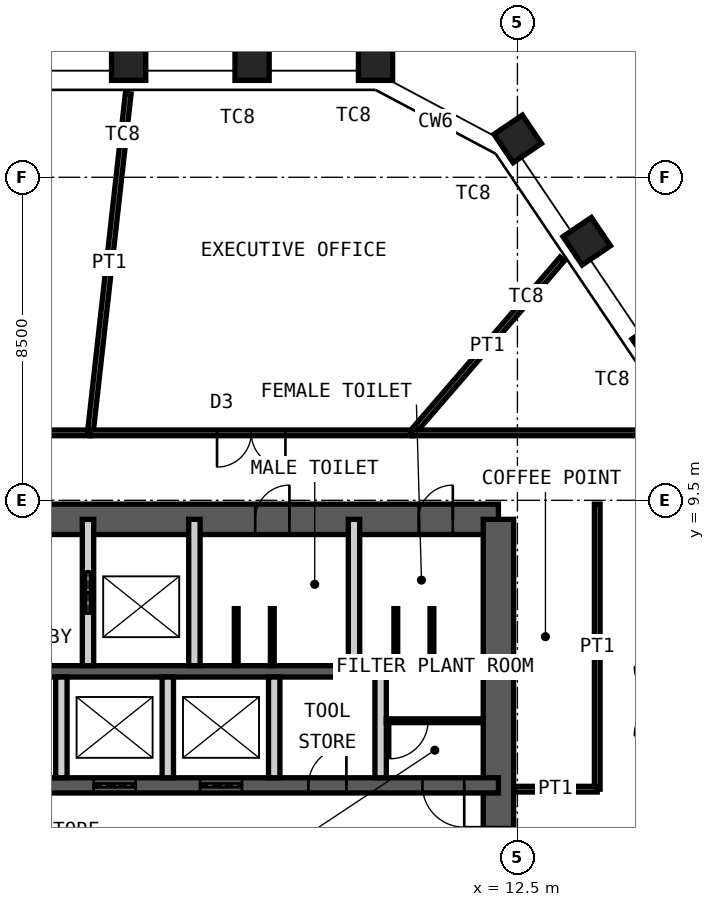
"""IFC4 building model, lengths in metres.
Left out: names, types, materials, properties, quantities, classifications, styles, units other than length and angle.
Written with IfcOpenShell. Run it as: python <this file> out.ifc"""

import sys

from ifc_helpers import new_model, si_unit, direction, frame, frame_2d, origin, origin_2d, place, context, subcontext, project, spatial, rectangle, hollow_rectangle, extrude, element, fill, save


model = new_model("IFC4")
c1 = context("Model", 3, precision=1e-05, world=origin(), true_north=direction((0.0, 1.0)))
c2 = subcontext(c1, "Body", "Model", "MODEL_VIEW")
j1 = project(units=[si_unit("LENGTHUNIT", "METRE"), si_unit("PLANEANGLEUNIT", "RADIAN")], contexts=[c1])
p1 = place(None, origin())
s1 = spatial("IfcSite", under=j1, at=p1, CompositionType="ELEMENT")
p2 = place(p1, origin())
s2 = spatial("IfcBuilding", under=s1, at=p2, CompositionType="ELEMENT")
p3 = place(p2, frame((0.0, 0.0, 333.4)))
s3 = spatial("IfcBuildingStorey", under=s2, at=p3, CompositionType="ELEMENT", Elevation=333.4)
for number, where, z_axis, x_axis in (
    (1, (2.27, 21.0, 0.0), (0.0, 0.0, 1.0), (-1.0, 0.0, 0.0)),
    (2, (5.518, 21.0, 0.0), (0.0, 0.0, 1.0), (-1.0, 0.0, 0.0)),
    (3, (8.766, 21.0, 0.0), (0.0, 0.0, 1.0), (-1.0, 0.0, 0.0)),
    (4, (12.508, 19.01, 0.0), (0.0, 0.0, 1.0), (-0.559, 0.829, 0.0)),
    (5, (14.324, 16.318, 0.0), (0.0, 0.0, 1.0), (-0.559, 0.829, 0.0)),
    (6, (16.141, 13.625, 0.0), (0.0, 0.0, 1.0), (-0.559, 0.829, 0.0)),
):
    element("IfcColumn", number, at=place(p3, frame(where, z_axis=z_axis, x_axis=x_axis)), inside=s3, PredefinedType="COLUMN", context=c2, shape_type="SweptSolid", body=[
        extrude(hollow_rectangle(XDim=0.9, YDim=0.9, WallThickness=0.05, at=origin_2d()), origin(), (0.0, 0.0, 1.0), 4.2),
    ])
p4 = place(p3, frame((-12.0, 9.0, 0.0), z_axis=(0.0, 0.0, 1.0), x_axis=(1.0, 0.0, 0.0)))
e7 = element("IfcWall", 7, at=p4, inside=s3, PredefinedType="SHEAR", context=c2, shape_type="SweptSolid", body=[
    extrude(rectangle(XDim=24.0, YDim=0.8, at=frame_2d((12.0, 0.0))), origin(), (0.0, 0.0, 1.0), 4.2),
])
p5 = place(p4, frame((10.4, 0.0, 0.0)))
e8 = element("IfcOpeningElement", 8, at=p5, cuts=e7, PredefinedType="OPENING", context=c2, shape_type="SweptSolid", body=[
    extrude(rectangle(XDim=1.0, YDim=2.1, at=frame_2d((0.5, 1.05))), frame((0.0, 0.41, 0.0), z_axis=(0.0, -1.0, 0.0), x_axis=(1.0, 0.0, 0.0)), (0.0, 0.0, 1.0), 0.82),
])
p6 = place(p4, frame((17.6, 0.0, 0.0)))
e9 = element("IfcOpeningElement", 9, at=p6, cuts=e7, PredefinedType="OPENING", context=c2, shape_type="SweptSolid", body=[
    extrude(rectangle(XDim=0.9, YDim=2.1, at=frame_2d((0.45, 1.05))), frame((0.0, 0.41, 0.0), z_axis=(0.0, -1.0, 0.0), x_axis=(1.0, 0.0, 0.0)), (0.0, 0.0, 1.0), 0.82),
])
p7 = place(p4, frame((21.9, 0.0, 0.0)))
e10 = element("IfcOpeningElement", 10, at=p7, cuts=e7, PredefinedType="OPENING", context=c2, shape_type="SweptSolid", body=[
    extrude(rectangle(XDim=0.9, YDim=2.1, at=frame_2d((0.45, 1.05))), frame((0.0, 0.41, 0.0), z_axis=(0.0, -1.0, 0.0), x_axis=(1.0, 0.0, 0.0)), (0.0, 0.0, 1.0), 0.82),
])
p8 = place(p3, frame((12.0, -9.0, 0.0), z_axis=(0.0, 0.0, 1.0), x_axis=(0.0, 1.0, 0.0)))
e11 = element("IfcWall", 11, at=p8, inside=s3, PredefinedType="SHEAR", context=c2, shape_type="SweptSolid", body=[
    extrude(rectangle(XDim=18.0, YDim=0.8, at=frame_2d((9.0, 0.0))), origin(), (0.0, 0.0, 1.0), 4.2),
])
p9 = place(p8, frame((8.1, 0.0, 0.0)))
e12 = element("IfcOpeningElement", 12, at=p9, cuts=e11, PredefinedType="OPENING", context=c2, shape_type="SweptSolid", body=[
    extrude(rectangle(XDim=1.8, YDim=2.1, at=frame_2d((0.9, 1.05))), frame((0.0, 0.41, 0.0), z_axis=(0.0, -1.0, 0.0), x_axis=(1.0, 0.0, 0.0)), (0.0, 0.0, 1.0), 0.82),
])
p10 = place(p3, frame((-12.0, 5.0, 0.0), z_axis=(0.0, 0.0, 1.0), x_axis=(1.0, 0.0, 0.0)))
e13 = element("IfcWall", 13, at=p10, inside=s3, PredefinedType="SHEAR", context=c2, shape_type="SweptSolid", body=[
    extrude(rectangle(XDim=24.0, YDim=0.3, at=frame_2d((12.0, 0.0))), origin(), (0.0, 0.0, 1.0), 4.2),
])
p11 = place(p3, frame((-12.0, 2.0, 0.0), z_axis=(0.0, 0.0, 1.0), x_axis=(1.0, 0.0, 0.0)))
e14 = element("IfcWall", 14, at=p11, inside=s3, PredefinedType="SHEAR", context=c2, shape_type="SweptSolid", body=[
    extrude(rectangle(XDim=24.0, YDim=0.4, at=frame_2d((12.0, 0.0))), origin(), (0.0, 0.0, 1.0), 4.2),
])
p12 = place(p11, frame((2.4, 0.0, 0.0)))
e15 = element("IfcOpeningElement", 15, at=p12, cuts=e14, PredefinedType="OPENING", context=c2, shape_type="SweptSolid", body=[
    extrude(rectangle(XDim=1.1, YDim=2.1, at=frame_2d((0.55, 1.05))), frame((0.0, 0.21, 0.0), z_axis=(0.0, -1.0, 0.0), x_axis=(1.0, 0.0, 0.0)), (0.0, 0.0, 1.0), 0.42),
])
p13 = place(p11, frame((22.0, 0.0, 0.0)))
e16 = element("IfcOpeningElement", 16, at=p13, cuts=e14, PredefinedType="OPENING", context=c2, shape_type="SweptSolid", body=[
    extrude(rectangle(XDim=1.1, YDim=2.1, at=frame_2d((0.55, 1.05))), frame((0.0, 0.21, 0.0), z_axis=(0.0, -1.0, 0.0), x_axis=(1.0, 0.0, 0.0)), (0.0, 0.0, 1.0), 0.42),
])
p14 = place(p11, frame((10.15, 0.0, 0.0)))
e17 = element("IfcOpeningElement", 17, at=p14, cuts=e14, PredefinedType="OPENING", context=c2, shape_type="SweptSolid", body=[
    extrude(rectangle(XDim=1.0, YDim=2.1, at=frame_2d((0.5, 1.05))), frame((0.0, 0.21, 0.0), z_axis=(0.0, -1.0, 0.0), x_axis=(1.0, 0.0, 0.0)), (0.0, 0.0, 1.0), 0.42),
])
p15 = place(p11, frame((6.9, 0.0, 0.0)))
e18 = element("IfcOpeningElement", 18, at=p15, cuts=e14, PredefinedType="OPENING", context=c2, shape_type="SweptSolid", body=[
    extrude(rectangle(XDim=1.0, YDim=2.1, at=frame_2d((0.5, 1.05))), frame((0.0, 0.21, 0.0), z_axis=(0.0, -1.0, 0.0), x_axis=(1.0, 0.0, 0.0)), (0.0, 0.0, 1.0), 0.42),
])
p16 = place(p11, frame((13.35, 0.0, 0.0)))
e19 = element("IfcOpeningElement", 19, at=p16, cuts=e14, PredefinedType="OPENING", context=c2, shape_type="SweptSolid", body=[
    extrude(rectangle(XDim=1.1, YDim=2.4, at=frame_2d((0.55, 1.2))), frame((0.0, 0.21, 0.0), z_axis=(0.0, -1.0, 0.0), x_axis=(1.0, 0.0, 0.0)), (0.0, 0.0, 1.0), 0.42),
])
p17 = place(p11, frame((16.15, 0.0, 0.0)))
e20 = element("IfcOpeningElement", 20, at=p17, cuts=e14, PredefinedType="OPENING", context=c2, shape_type="SweptSolid", body=[
    extrude(rectangle(XDim=1.1, YDim=2.4, at=frame_2d((0.55, 1.2))), frame((0.0, 0.21, 0.0), z_axis=(0.0, -1.0, 0.0), x_axis=(1.0, 0.0, 0.0)), (0.0, 0.0, 1.0), 0.42),
])
p18 = place(p11, frame((19.0, 0.0, 0.0)))
e21 = element("IfcOpeningElement", 21, at=p18, cuts=e14, PredefinedType="OPENING", context=c2, shape_type="SweptSolid", body=[
    extrude(rectangle(XDim=1.0, YDim=2.1, at=frame_2d((0.5, 1.05))), frame((0.0, 0.21, 0.0), z_axis=(0.0, -1.0, 0.0), x_axis=(1.0, 0.0, 0.0)), (0.0, 0.0, 1.0), 0.42),
])
p19 = place(p3, frame((1.2, 5.15, 0.0), z_axis=(0.0, 0.0, 1.0), x_axis=(0.0, 1.0, 0.0)))
e22 = element("IfcWall", 22, at=p19, inside=s3, PredefinedType="PARTITIONING", context=c2, shape_type="SweptSolid", body=[
    extrude(rectangle(XDim=3.85, YDim=0.3, at=frame_2d((1.925, 0.0))), origin(), (0.0, 0.0, 1.0), 3.98),
])
p20 = place(p19, frame((1.375, 0.0, 0.0)))
e23 = element("IfcOpeningElement", 23, at=p20, cuts=e22, PredefinedType="OPENING", context=c2, shape_type="SweptSolid", body=[
    extrude(rectangle(XDim=1.1, YDim=2.4, at=frame_2d((0.55, 1.2))), frame((0.0, 0.16, 0.0), z_axis=(0.0, -1.0, 0.0), x_axis=(1.0, 0.0, 0.0)), (0.0, 0.0, 1.0), 0.32),
])
for number, where, z_axis, x_axis in (
    (24, (4.0, 5.15, 0.0), (0.0, 0.0, 1.0), (0.0, 1.0, 0.0)),
    (25, (8.2, 5.15, 0.0), (0.0, 0.0, 1.0), (0.0, 1.0, 0.0)),
):
    element("IfcWall", number, at=place(p3, frame(where, z_axis=z_axis, x_axis=x_axis)), inside=s3, PredefinedType="PARTITIONING", context=c2, shape_type="SweptSolid", body=[
        extrude(rectangle(XDim=3.85, YDim=0.3, at=frame_2d((1.925, 0.0))), origin(), (0.0, 0.0, 1.0), 3.98),
    ])
for number, where, z_axis, x_axis in (
    (26, (0.5, 2.2, 0.0), (0.0, 0.0, 1.0), (0.0, 1.0, 0.0)),
    (27, (3.3, 2.2, 0.0), (0.0, 0.0, 1.0), (0.0, 1.0, 0.0)),
    (28, (6.1, 2.2, 0.0), (0.0, 0.0, 1.0), (0.0, 1.0, 0.0)),
    (29, (8.9, 2.2, 0.0), (0.0, 0.0, 1.0), (0.0, 1.0, 0.0)),
):
    element("IfcWall", number, at=place(p3, frame(where, z_axis=z_axis, x_axis=x_axis)), inside=s3, PredefinedType="PARTITIONING", context=c2, shape_type="SweptSolid", body=[
        extrude(rectangle(XDim=2.65, YDim=0.3, at=frame_2d((1.325, 0.0))), origin(), (0.0, 0.0, 1.0), 3.98),
    ])
p21 = place(p3, frame((9.05, 3.7, 0.0), z_axis=(0.0, 0.0, 1.0), x_axis=(1.0, 0.0, 0.0)))
e30 = element("IfcWall", 30, at=p21, inside=s3, PredefinedType="PARTITIONING", context=c2, shape_type="SweptSolid", body=[
    extrude(rectangle(XDim=2.55, YDim=0.1, at=frame_2d((1.275, 0.0))), origin(), (0.0, 0.0, 1.0), 3.98),
])
p22 = place(p21, frame((0.1, 0.0, 0.0)))
e31 = element("IfcOpeningElement", 31, at=p22, cuts=e30, PredefinedType="OPENING", context=c2, shape_type="SweptSolid", body=[
    extrude(rectangle(XDim=1.0, YDim=2.4, at=frame_2d((0.5, 1.2))), frame((0.0, 0.06, 0.0), z_axis=(0.0, -1.0, 0.0), x_axis=(1.0, 0.0, 0.0)), (0.0, 0.0, 1.0), 0.12),
])
for number, where, z_axis, x_axis in (
    (32, (5.1, 5.15, 0.0), (0.0, 0.0, 1.0), (0.0, 1.0, 0.0)),
    (33, (6.05, 5.15, 0.0), (0.0, 0.0, 1.0), (0.0, 1.0, 0.0)),
    (34, (9.3, 5.15, 0.0), (0.0, 0.0, 1.0), (0.0, 1.0, 0.0)),
    (35, (10.25, 5.15, 0.0), (0.0, 0.0, 1.0), (0.0, 1.0, 0.0)),
):
    element("IfcWall", number, at=place(p3, frame(where, z_axis=z_axis, x_axis=x_axis)), inside=s3, PredefinedType="PARTITIONING", context=c2, shape_type="SweptSolid", body=[
        extrude(rectangle(XDim=1.5, YDim=0.1, at=frame_2d((0.75, 0.0))), origin(), (0.0, 0.0, 1.0), 2.1),
    ])
p23 = place(p3, frame((-4.151, 11.275, 0.0), z_axis=(0.0, 0.0, 1.0), x_axis=(1.0, 0.0, 0.0)))
e36 = element("IfcWall", 36, at=p23, inside=s3, PredefinedType="PARTITIONING", context=c2, shape_type="SweptSolid", body=[
    extrude(rectangle(XDim=5.412, YDim=0.15, at=frame_2d((2.706, 0.0))), origin(), (0.0, 0.0, 1.0), 3.92),
])
p24 = place(p23, frame((1.806, 0.0, 0.0)))
e37 = element("IfcOpeningElement", 37, at=p24, cuts=e36, PredefinedType="OPENING", context=c2, shape_type="SweptSolid", body=[
    extrude(rectangle(XDim=1.8, YDim=2.4, at=frame_2d((0.9, 1.2))), frame((0.0, 0.085, 0.0), z_axis=(0.0, -1.0, 0.0), x_axis=(1.0, 0.0, 0.0)), (0.0, 0.0, 1.0), 0.17),
])
p25 = place(p3, frame((2.259, 20.201, 0.0), z_axis=(0.0, 0.0, 1.0), x_axis=(-0.111123668582, -0.993806585952, 0.0)))
e38 = element("IfcWall", 38, at=p25, inside=s3, PredefinedType="PARTITIONING", context=c2, shape_type="SweptSolid", body=[
    extrude(rectangle(XDim=8.981, YDim=0.15, at=frame_2d((4.491, 0.0))), origin(), (0.0, 0.0, 1.0), 2.72),
])
p26 = place(p3, frame((1.261, 11.275, 0.0), z_axis=(0.0, 0.0, 1.0), x_axis=(1.0, 0.0, 0.0)))
e39 = element("IfcWall", 39, at=p26, inside=s3, PredefinedType="PARTITIONING", context=c2, shape_type="SweptSolid", body=[
    extrude(rectangle(XDim=8.469, YDim=0.15, at=frame_2d((4.235, 0.0))), origin(), (0.0, 0.0, 1.0), 3.92),
])
p27 = place(p26, frame((3.335, 0.0, 0.0)))
e40 = element("IfcOpeningElement", 40, at=p27, cuts=e39, PredefinedType="OPENING", context=c2, shape_type="SweptSolid", body=[
    extrude(rectangle(XDim=1.8, YDim=2.4, at=frame_2d((0.9, 1.2))), frame((0.0, 0.085, 0.0), z_axis=(0.0, -1.0, 0.0), x_axis=(1.0, 0.0, 0.0)), (0.0, 0.0, 1.0), 0.17),
])
p28 = place(p3, frame((13.678, 15.85, 0.0), z_axis=(0.0, 0.0, 1.0), x_axis=(-0.65333269737, -0.757070925704, 0.0)))
e41 = element("IfcWall", 41, at=p28, inside=s3, PredefinedType="PARTITIONING", context=c2, shape_type="SweptSolid", body=[
    extrude(rectangle(XDim=6.044, YDim=0.15, at=frame_2d((3.022, 0.0))), origin(), (0.0, 0.0, 1.0), 2.72),
])
p29 = place(p3, frame((9.73, 11.275, 0.0), z_axis=(0.0, 0.0, 1.0), x_axis=(1.0, 0.0, 0.0)))
e42 = element("IfcWall", 42, at=p29, inside=s3, PredefinedType="PARTITIONING", context=c2, shape_type="SweptSolid", body=[
    extrude(rectangle(XDim=6.745, YDim=0.15, at=frame_2d((3.373, 0.0))), origin(), (0.0, 0.0, 1.0), 3.92),
])
p30 = place(p3, frame((14.6, 1.9, 0.0), z_axis=(0.0, 0.0, 1.0), x_axis=(0.0, 1.0, 0.0)))
e43 = element("IfcWall", 43, at=p30, inside=s3, PredefinedType="PARTITIONING", context=c2, shape_type="SweptSolid", body=[
    extrude(rectangle(XDim=7.5, YDim=0.15, at=frame_2d((3.75, 0.0))), origin(), (0.0, 0.0, 1.0), 3.92),
])
p31 = place(p3, frame((12.4, 1.9, 0.0), z_axis=(0.0, 0.0, 1.0), x_axis=(1.0, 0.0, 0.0)))
e44 = element("IfcWall", 44, at=p31, inside=s3, PredefinedType="PARTITIONING", context=c2, shape_type="SweptSolid", body=[
    extrude(rectangle(XDim=2.2, YDim=0.15, at=frame_2d((1.1, 0.0))), origin(), (0.0, 0.0, 1.0), 2.72),
])
p32 = place(p6, origin())
e45 = element("IfcDoor", 45, at=p32, inside=s3, OperationType="SINGLE_SWING_LEFT", PredefinedType="DOOR", context=c2, shape_type="SweptSolid", body=[
    extrude(rectangle(XDim=0.9, YDim=2.1, at=frame_2d((0.45, 1.05))), frame((0.0, 0.025, 0.0), z_axis=(0.0, -1.0, 0.0), x_axis=(1.0, 0.0, 0.0)), (0.0, 0.0, 1.0), 0.05),
])
fill(e9, e45)
p33 = place(p7, origin())
e46 = element("IfcDoor", 46, at=p33, inside=s3, OperationType="SINGLE_SWING_LEFT", PredefinedType="DOOR", context=c2, shape_type="SweptSolid", body=[
    extrude(rectangle(XDim=0.9, YDim=2.1, at=frame_2d((0.45, 1.05))), frame((0.0, 0.025, 0.0), z_axis=(0.0, -1.0, 0.0), x_axis=(1.0, 0.0, 0.0)), (0.0, 0.0, 1.0), 0.05),
])
fill(e10, e46)
p34 = place(p13, origin())
e47 = element("IfcDoor", 47, at=p34, inside=s3, OperationType="SINGLE_SWING_RIGHT", PredefinedType="DOOR", context=c2, shape_type="SweptSolid", body=[
    extrude(rectangle(XDim=1.1, YDim=2.1, at=frame_2d((0.55, 1.05))), frame((0.0, 0.025, 0.0), z_axis=(0.0, -1.0, 0.0), x_axis=(1.0, 0.0, 0.0)), (0.0, 0.0, 1.0), 0.05),
])
fill(e16, e47)
p35 = place(p9, origin())
e48 = element("IfcDoor", 48, at=p35, inside=s3, OperationType="DOUBLE_DOOR_DOUBLE_SWING", PredefinedType="DOOR", context=c2, shape_type="SweptSolid", body=[
    extrude(rectangle(XDim=1.8, YDim=2.1, at=frame_2d((0.9, 1.05))), frame((0.0, 0.025, 0.0), z_axis=(0.0, -1.0, 0.0), x_axis=(1.0, 0.0, 0.0)), (0.0, 0.0, 1.0), 0.05),
])
fill(e12, e48)
p36 = place(p20, origin())
e49 = element("IfcDoor", 49, at=p36, inside=s3, OperationType="DOUBLE_DOOR_SLIDING", PredefinedType="DOOR", context=c2, shape_type="SweptSolid", body=[
    extrude(rectangle(XDim=1.1, YDim=2.4, at=frame_2d((0.55, 1.2))), frame((0.0, 0.025, 0.0), z_axis=(0.0, -1.0, 0.0), x_axis=(1.0, 0.0, 0.0)), (0.0, 0.0, 1.0), 0.05),
])
fill(e23, e49)
p37 = place(p16, origin())
e50 = element("IfcDoor", 50, at=p37, inside=s3, OperationType="DOUBLE_DOOR_SLIDING", PredefinedType="DOOR", context=c2, shape_type="SweptSolid", body=[
    extrude(rectangle(XDim=1.1, YDim=2.4, at=frame_2d((0.55, 1.2))), frame((0.0, 0.025, 0.0), z_axis=(0.0, -1.0, 0.0), x_axis=(1.0, 0.0, 0.0)), (0.0, 0.0, 1.0), 0.05),
])
fill(e19, e50)
p38 = place(p17, origin())
e51 = element("IfcDoor", 51, at=p38, inside=s3, OperationType="DOUBLE_DOOR_SLIDING", PredefinedType="DOOR", context=c2, shape_type="SweptSolid", body=[
    extrude(rectangle(XDim=1.1, YDim=2.4, at=frame_2d((0.55, 1.2))), frame((0.0, 0.025, 0.0), z_axis=(0.0, -1.0, 0.0), x_axis=(1.0, 0.0, 0.0)), (0.0, 0.0, 1.0), 0.05),
])
fill(e20, e51)
p39 = place(p18, origin())
e52 = element("IfcDoor", 52, at=p39, inside=s3, OperationType="SINGLE_SWING_LEFT", PredefinedType="DOOR", context=c2, shape_type="SweptSolid", body=[
    extrude(rectangle(XDim=1.0, YDim=2.1, at=frame_2d((0.5, 1.05))), frame((0.0, 0.025, 0.0), z_axis=(0.0, -1.0, 0.0), x_axis=(1.0, 0.0, 0.0)), (0.0, 0.0, 1.0), 0.05),
])
fill(e21, e52)
p40 = place(p22, origin())
e53 = element("IfcDoor", 53, at=p40, inside=s3, OperationType="SINGLE_SWING_LEFT", PredefinedType="DOOR", context=c2, shape_type="SweptSolid", body=[
    extrude(rectangle(XDim=1.0, YDim=2.4, at=frame_2d((0.5, 1.2))), frame((0.0, 0.025, 0.0), z_axis=(0.0, -1.0, 0.0), x_axis=(1.0, 0.0, 0.0)), (0.0, 0.0, 1.0), 0.05),
])
fill(e31, e53)
p41 = place(p27, origin())
e54 = element("IfcDoor", 54, at=p41, inside=s3, OperationType="DOUBLE_DOOR_DOUBLE_SWING", PredefinedType="DOOR", context=c2, shape_type="SweptSolid", body=[
    extrude(rectangle(XDim=1.8, YDim=2.4, at=frame_2d((0.9, 1.2))), frame((0.0, 0.025, 0.0), z_axis=(0.0, -1.0, 0.0), x_axis=(1.0, 0.0, 0.0)), (0.0, 0.0, 1.0), 0.05),
])
fill(e40, e54)
save(model, sys.argv[1])
